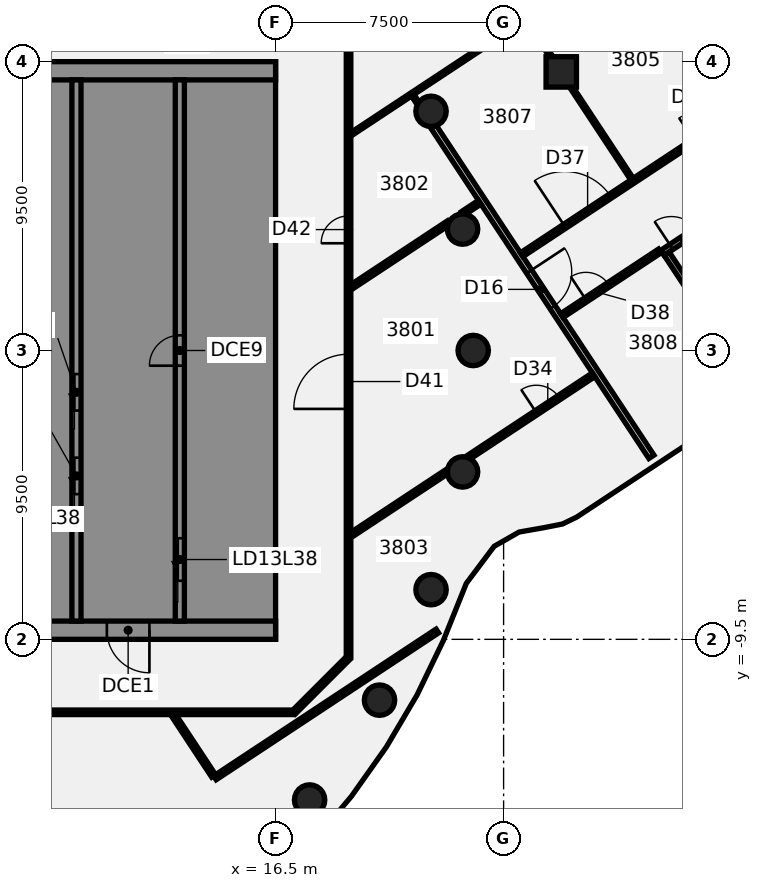
"""IFC4 building model, lengths in metres.
Left out: names, types, materials, properties, quantities, classifications, styles, units other than length and angle.
Written with IfcOpenShell. Run it as: python <this file> out.ifc"""

import sys

from ifc_helpers import new_model, si_unit, direction, frame, frame_2d, origin, origin_2d, place, context, subcontext, project, spatial, polyline, rectangle, circle, outline, extrude, element, fill, save


model = new_model("IFC4")
c1 = context("Model", 3, precision=1e-05, world=origin(), true_north=direction((0.0, 1.0)))
c2 = subcontext(c1, "Body", "Model", "MODEL_VIEW")
j1 = project(units=[si_unit("LENGTHUNIT", "METRE"), si_unit("PLANEANGLEUNIT", "RADIAN")], contexts=[c1])
p1 = place(None, origin())
s1 = spatial("IfcSite", under=j1, at=p1, CompositionType="ELEMENT")
p2 = place(p1, origin())
s2 = spatial("IfcBuilding", under=s1, at=p2, CompositionType="ELEMENT")
p3 = place(p2, frame((0.0, 0.0, 155.5)))
s3 = spatial("IfcBuildingStorey", under=s2, at=p3, CompositionType="ELEMENT", Elevation=155.5)
for number, where, z_axis, x_axis in (
    (1, (23.0, 0.0, -0.14), (0.0, 0.0, 1.0), (1.0, 0.0, 0.0)),
    (2, (22.651, 3.994, -0.14), (0.0, 0.0, 1.0), (1.0, 0.0, 0.0)),
    (3, (21.613, 7.866, -0.14), (0.0, 0.0, 1.0), (1.0, 0.0, 0.0)),
    (4, (17.619, -14.784, -0.14), (0.0, 0.0, 1.0), (1.0, 0.0, 0.0)),
    (5, (19.919, -11.5, -0.14), (0.0, 0.0, 1.0), (1.0, 0.0, 0.0)),
    (6, (21.613, -7.866, -0.14), (0.0, 0.0, 1.0), (1.0, 0.0, 0.0)),
    (7, (22.651, -3.994, -0.14), (0.0, 0.0, 1.0), (1.0, 0.0, 0.0)),
):
    element("IfcColumn", number, at=place(p3, frame(where, z_axis=z_axis, x_axis=x_axis)), inside=s3, PredefinedType="COLUMN", context=c2, shape_type="SweptSolid", body=[
        extrude(circle(Radius=0.5, at=origin_2d()), origin(), (0.0, 0.0, 1.0), 3.75),
    ])
p4 = place(p3, frame((25.896, 9.163, -0.139), z_axis=(-0.044706213481, 0.018481171221, 0.998829215025), x_axis=(0.55085630211, -0.833637157717, 0.040080215802)))
e8 = element("IfcColumn", 8, at=p4, inside=s3, PredefinedType="COLUMN", context=c2, shape_type="SweptSolid", body=[
    extrude(rectangle(XDim=1.0, YDim=1.0, at=origin_2d()), origin(), (0.0, 0.0, 1.0), 3.752),
])
p5 = place(p3, frame((2.494, -11.983, 0.0), z_axis=(0.0, 0.0, 1.0), x_axis=(0.550935265348, -0.834547981482, 0.0)))
e9 = element("IfcWall", 9, at=p5, inside=s3, PredefinedType="PARTITIONING", context=c2, shape_type="SweptSolid", body=[
    extrude(rectangle(XDim=13.413, YDim=0.1, at=frame_2d((6.707, 0.0))), origin(), (0.0, 0.0, 1.0), 3.01),
])
p6 = place(p3, frame((13.147, -12.0, 0.0), z_axis=(0.0, 0.0, 1.0), x_axis=(0.550825117354, -0.834620686355, 0.0)))
e10 = element("IfcWall", 10, at=p6, inside=s3, PredefinedType="PARTITIONING", context=c2, shape_type="SweptSolid", body=[
    extrude(rectangle(XDim=2.388, YDim=0.15, at=frame_2d((1.194, 0.0))), origin(), (0.0, 0.0, 1.0), 3.01),
])
p7 = place(p3, frame((21.011, 8.394, 0.0), z_axis=(0.0, 0.0, 1.0), x_axis=(0.551266985396, -0.834328898464, 0.0)))
e11 = element("IfcWall", 11, at=p7, inside=s3, PredefinedType="PARTITIONING", context=c2, shape_type="SweptSolid", body=[
    extrude(rectangle(XDim=0.312, YDim=0.1, at=frame_2d((0.156, 0.0))), origin(), (0.0, 0.0, 1.0), 3.01),
])
p8 = place(p3, frame((21.684, 7.375, 0.0), z_axis=(0.0, 0.0, 1.0), x_axis=(0.550962555751, -0.834529964806, 0.0)))
e12 = element("IfcWall", 12, at=p8, inside=s3, PredefinedType="PARTITIONING", context=c2, shape_type="SweptSolid", body=[
    extrude(rectangle(XDim=13.028, YDim=0.2, at=frame_2d((6.514, 0.0))), origin(), (0.0, 0.0, 1.0), 3.01),
])
p9 = place(p8, frame((5.729, 0.0, 0.0)))
e13 = element("IfcOpeningElement", 13, at=p9, cuts=e12, PredefinedType="OPENING", context=c2, shape_type="SweptSolid", body=[
    extrude(rectangle(XDim=1.4, YDim=2.1, at=frame_2d((0.7, 1.05))), frame((0.0, 0.11, 0.0), z_axis=(0.0, -1.0, 0.0), x_axis=(1.0, 0.0, 0.0)), (0.0, 0.0, 1.0), 0.22),
])
p10 = place(p3, frame((25.204, 10.212, 0.0), z_axis=(0.0, 0.0, 1.0), x_axis=(0.551183703578, -0.834383919374, 0.0)))
e14 = element("IfcWall", 14, at=p10, inside=s3, PredefinedType="PARTITIONING", context=c2, shape_type="SweptSolid", body=[
    extrude(rectangle(XDim=0.578, YDim=0.1, at=frame_2d((0.289, 0.0))), origin(), (0.0, 0.0, 1.0), 3.01),
])
p11 = place(p3, frame((26.18, 8.732, 0.0), z_axis=(0.0, 0.0, 1.0), x_axis=(0.550851378046, -0.834603354477, 0.0)))
e15 = element("IfcWall", 15, at=p11, inside=s3, PredefinedType="PARTITIONING", context=c2, shape_type="SweptSolid", body=[
    extrude(rectangle(XDim=3.709, YDim=0.1, at=frame_2d((1.854, 0.0))), origin(), (0.0, 0.0, 1.0), 3.01),
])
p12 = place(p3, frame((28.976, 12.666, 0.0), z_axis=(0.0, 0.0, 1.0), x_axis=(0.550994449366, -0.834508907543, 0.0)))
e16 = element("IfcWall", 16, at=p12, inside=s3, PredefinedType="PARTITIONING", context=c2, shape_type="SweptSolid", body=[
    extrude(rectangle(XDim=5.451, YDim=0.1, at=frame_2d((2.726, 0.0))), origin(), (0.0, 0.0, 1.0), 3.01),
])
p13 = place(p3, frame((-17.1, -11.9, 0.0), z_axis=(0.0, 0.0, 1.0), x_axis=(1.0, 0.0, 0.0)))
e17 = element("IfcWall", 17, at=p13, inside=s3, PredefinedType="PARTITIONING", context=c2, shape_type="SweptSolid", body=[
    extrude(rectangle(XDim=34.165, YDim=0.15, at=frame_2d((17.083, 0.0))), origin(), (0.0, 0.0, 1.0), 3.01),
])
p14 = place(p13, frame((9.838, 0.0, 0.0)))
e18 = element("IfcOpeningElement", 18, at=p14, cuts=e17, PredefinedType="OPENING", context=c2, shape_type="SweptSolid", body=[
    extrude(rectangle(XDim=1.8, YDim=2.1, at=frame_2d((0.9, 1.05))), frame((0.0, 0.085, 0.0), z_axis=(0.0, -1.0, 0.0), x_axis=(1.0, 0.0, 0.0)), (0.0, 0.0, 1.0), 0.17),
])
p15 = place(p13, frame((3.45, 0.0, 0.0)))
e19 = element("IfcOpeningElement", 19, at=p15, cuts=e17, PredefinedType="OPENING", context=c2, shape_type="SweptSolid", body=[
    extrude(rectangle(XDim=1.8, YDim=2.1, at=frame_2d((0.9, 1.05))), frame((0.0, 0.085, 0.0), z_axis=(0.0, -1.0, 0.0), x_axis=(1.0, 0.0, 0.0)), (0.0, 0.0, 1.0), 0.17),
])
p16 = place(p13, frame((23.889, 0.0, 0.0)))
e20 = element("IfcOpeningElement", 20, at=p16, cuts=e17, PredefinedType="OPENING", context=c2, shape_type="SweptSolid", body=[
    extrude(rectangle(XDim=1.8, YDim=2.1, at=frame_2d((0.9, 1.05))), frame((0.0, 0.085, 0.0), z_axis=(0.0, -1.0, 0.0), x_axis=(1.0, 0.0, 0.0)), (0.0, 0.0, 1.0), 0.17),
])
p17 = place(p3, frame((14.504, -14.056, 0.0), z_axis=(0.0, 0.0, 1.0), x_axis=(0.83453104674, 0.550960916969, 0.0)))
e21 = element("IfcWall", 21, at=p17, inside=s3, PredefinedType="PARTITIONING", context=c2, shape_type="SweptSolid", body=[
    extrude(rectangle(XDim=8.767, YDim=0.15, at=frame_2d((4.384, 0.0))), origin(), (0.0, 0.0, 1.0), 3.01),
])
p18 = place(p3, frame((19.0, -6.055, 0.0), z_axis=(0.0, 0.0, 1.0), x_axis=(0.834514075332, 0.550986622409, 0.0)))
e22 = element("IfcWall", 22, at=p18, inside=s3, PredefinedType="PARTITIONING", context=c2, shape_type="SweptSolid", body=[
    extrude(rectangle(XDim=3.768, YDim=0.15, at=frame_2d((1.884, 0.0))), origin(), (0.0, 0.0, 1.0), 3.01),
])
p19 = place(p3, frame((22.824, -3.53, 0.0), z_axis=(0.0, 0.0, 1.0), x_axis=(0.834519729805, 0.550978058152, 0.0)))
e23 = element("IfcWall", 23, at=p19, inside=s3, PredefinedType="PARTITIONING", context=c2, shape_type="SweptSolid", body=[
    extrude(rectangle(XDim=4.957, YDim=0.15, at=frame_2d((2.479, 0.0))), origin(), (0.0, 0.0, 1.0), 3.01),
])
p20 = place(p19, frame((2.7, 0.0, 0.0)))
e24 = element("IfcOpeningElement", 24, at=p20, cuts=e23, PredefinedType="OPENING", context=c2, shape_type="SweptSolid", body=[
    extrude(rectangle(XDim=0.9, YDim=2.1, at=frame_2d((0.45, 1.05))), frame((0.0, 0.085, 0.0), z_axis=(0.0, -1.0, 0.0), x_axis=(1.0, 0.0, 0.0)), (0.0, 0.0, 1.0), 0.17),
])
p21 = place(p3, frame((19.0, 2.093, 0.0), z_axis=(0.0, 0.0, 1.0), x_axis=(0.834493361806, 0.551017993446, 0.0)))
e25 = element("IfcWall", 25, at=p21, inside=s3, PredefinedType="PARTITIONING", context=c2, shape_type="SweptSolid", body=[
    extrude(rectangle(XDim=3.831, YDim=0.15, at=frame_2d((1.916, 0.0))), origin(), (0.0, 0.0, 1.0), 3.01),
])
p22 = place(p3, frame((22.651, 4.504, 0.0), z_axis=(0.0, 0.0, 1.0), x_axis=(0.834599435949, 0.550857315022, 0.0)))
e26 = element("IfcWall", 26, at=p22, inside=s3, PredefinedType="PARTITIONING", context=c2, shape_type="SweptSolid", body=[
    extrude(rectangle(XDim=0.676, YDim=0.15, at=frame_2d((0.338, 0.0))), origin(), (0.0, 0.0, 1.0), 3.01),
])
p23 = place(p3, frame((18.983, 7.115, 0.0), z_axis=(0.0, 0.0, 1.0), x_axis=(0.834486104681, 0.551028983898, 0.0)))
e27 = element("IfcWall", 27, at=p23, inside=s3, PredefinedType="PARTITIONING", context=c2, shape_type="SweptSolid", body=[
    extrude(rectangle(XDim=5.026, YDim=0.1, at=frame_2d((2.513, 0.0))), origin(), (0.0, 0.0, 1.0), 3.01),
])
p24 = place(p3, frame((24.594, 3.15, 0.0), z_axis=(0.0, 0.0, 1.0), x_axis=(0.83452344528, 0.550972430598, 0.0)))
e28 = element("IfcWall", 28, at=p24, inside=s3, PredefinedType="PARTITIONING", context=c2, shape_type="SweptSolid", body=[
    extrude(rectangle(XDim=13.32, YDim=0.15, at=frame_2d((6.66, 0.0))), origin(), (0.0, 0.0, 1.0), 3.01),
])
p25 = place(p24, frame((6.8, 0.0, 0.0)))
e29 = element("IfcOpeningElement", 29, at=p25, cuts=e28, PredefinedType="OPENING", context=c2, shape_type="SweptSolid", body=[
    extrude(rectangle(XDim=0.9, YDim=2.1, at=frame_2d((0.45, 1.05))), frame((0.0, 0.085, 0.0), z_axis=(0.0, -1.0, 0.0), x_axis=(1.0, 0.0, 0.0)), (0.0, 0.0, 1.0), 0.17),
])
p26 = place(p24, frame((10.1, 0.0, 0.0)))
e30 = element("IfcOpeningElement", 30, at=p26, cuts=e28, PredefinedType="OPENING", context=c2, shape_type="SweptSolid", body=[
    extrude(rectangle(XDim=0.9, YDim=2.1, at=frame_2d((0.45, 1.05))), frame((0.0, 0.085, 0.0), z_axis=(0.0, -1.0, 0.0), x_axis=(1.0, 0.0, 0.0)), (0.0, 0.0, 1.0), 0.17),
])
p27 = place(p24, frame((1.7, 0.0, 0.0)))
e31 = element("IfcOpeningElement", 31, at=p27, cuts=e28, PredefinedType="OPENING", context=c2, shape_type="SweptSolid", body=[
    extrude(rectangle(XDim=1.8, YDim=2.1, at=frame_2d((0.9, 1.05))), frame((0.0, 0.085, 0.0), z_axis=(0.0, -1.0, 0.0), x_axis=(1.0, 0.0, 0.0)), (0.0, 0.0, 1.0), 0.17),
])
p28 = place(p3, frame((25.916, 1.147, 0.0), z_axis=(0.0, 0.0, 1.0), x_axis=(0.834600103277, 0.550856303958, 0.0)))
e32 = element("IfcWall", 32, at=p28, inside=s3, PredefinedType="PARTITIONING", context=c2, shape_type="SweptSolid", body=[
    extrude(rectangle(XDim=3.861, YDim=0.15, at=frame_2d((1.93, 0.0))), origin(), (0.0, 0.0, 1.0), 3.01),
])
p29 = place(p28, frame((0.95, 0.0, 0.0)))
e33 = element("IfcOpeningElement", 33, at=p29, cuts=e32, PredefinedType="OPENING", context=c2, shape_type="SweptSolid", body=[
    extrude(rectangle(XDim=0.9, YDim=2.1, at=frame_2d((0.45, 1.05))), frame((0.0, 0.085, 0.0), z_axis=(0.0, -1.0, 0.0), x_axis=(1.0, 0.0, 0.0)), (0.0, 0.0, 1.0), 0.17),
])
p30 = place(p3, frame((17.1, -11.9, 0.0), z_axis=(0.0, 0.0, 1.0), x_axis=(0.707106781187, 0.707106781187, 0.0)))
e34 = element("IfcWall", 34, at=p30, inside=s3, PredefinedType="PARTITIONING", context=c2, shape_type="SweptSolid", body=[
    extrude(rectangle(XDim=2.505, YDim=0.15, at=frame_2d((1.253, 0.0))), origin(), (0.0, 0.0, 1.0), 3.01),
])
p31 = place(p3, frame((18.9, -10.1, 0.0), z_axis=(0.0, 0.0, 1.0), x_axis=(0.0, 1.0, 0.0)))
e35 = element("IfcWall", 35, at=p31, inside=s3, PredefinedType="PARTITIONING", context=c2, shape_type="SweptSolid", body=[
    extrude(rectangle(XDim=20.2, YDim=0.15, at=frame_2d((10.1, 0.0))), origin(), (0.0, 0.0, 1.0), 3.01),
])
p32 = place(p31, frame((8.179, 0.0, 0.0)))
e36 = element("IfcOpeningElement", 36, at=p32, cuts=e35, PredefinedType="OPENING", context=c2, shape_type="SweptSolid", body=[
    extrude(rectangle(XDim=1.8, YDim=2.1, at=frame_2d((0.9, 1.05))), frame((0.0, 0.085, 0.0), z_axis=(0.0, -1.0, 0.0), x_axis=(1.0, 0.0, 0.0)), (0.0, 0.0, 1.0), 0.17),
])
p33 = place(p31, frame((13.627, 0.0, 0.0)))
e37 = element("IfcOpeningElement", 37, at=p33, cuts=e35, PredefinedType="OPENING", context=c2, shape_type="SweptSolid", body=[
    extrude(rectangle(XDim=0.9, YDim=2.1, at=frame_2d((0.45, 1.05))), frame((0.0, 0.085, 0.0), z_axis=(0.0, -1.0, 0.0), x_axis=(1.0, 0.0, 0.0)), (0.0, 0.0, 1.0), 0.17),
])
p34 = place(p3, frame((16.5, -9.2, 0.0), z_axis=(0.0, 0.0, 1.0), x_axis=(-1.0, 0.0, 0.0)))
e38 = element("IfcWall", 38, at=p34, inside=s3, PredefinedType="SHEAR", context=c2, shape_type="SweptSolid", body=[
    extrude(rectangle(XDim=13.0, YDim=0.6, at=frame_2d((6.5, 0.0))), origin(), (0.0, 0.0, 1.0), 3.61),
])
p35 = place(p34, frame((4.15, 0.0, 0.0)))
e39 = element("IfcOpeningElement", 39, at=p35, cuts=e38, PredefinedType="OPENING", context=c2, shape_type="SweptSolid", body=[
    extrude(rectangle(XDim=1.4, YDim=2.1, at=frame_2d((0.7, 1.05))), frame((0.0, 0.31, 0.0), z_axis=(0.0, -1.0, 0.0), x_axis=(1.0, 0.0, 0.0)), (0.0, 0.0, 1.0), 0.62),
])
p36 = place(p34, frame((10.125, 0.0, 0.0)))
e40 = element("IfcOpeningElement", 40, at=p36, cuts=e38, PredefinedType="OPENING", context=c2, shape_type="SweptSolid", body=[
    extrude(rectangle(XDim=1.4, YDim=2.1, at=frame_2d((0.7, 1.05))), frame((0.0, 0.31, 0.0), z_axis=(0.0, -1.0, 0.0), x_axis=(1.0, 0.0, 0.0)), (0.0, 0.0, 1.0), 0.62),
])
p37 = place(p3, origin())
e41 = element("IfcWall", 41, at=p37, inside=s3, PredefinedType="SHEAR", context=c2, shape_type="SweptSolid", body=[
    extrude(outline(polyline([(13.5, -8.125), (13.5, -8.9), (15.9, -8.9), (16.5, -8.9), (16.5, 8.9), (15.9, 8.9), (13.5, 8.9), (13.5, 8.125), (15.9, 8.125), (15.9, 5.625), (13.5, 5.625), (13.5, 5.375), (15.9, 5.375), (15.9, -5.375), (13.5, -5.375), (13.5, -5.625), (15.9, -5.625), (15.9, -8.125), (13.5, -8.125)])), origin(), (0.0, 0.0, 1.0), 3.61),
])
p38 = place(p3, frame((16.5, 9.2, 0.0), z_axis=(0.0, 0.0, 1.0), x_axis=(-1.0, 0.0, 0.0)))
e42 = element("IfcWall", 42, at=p38, inside=s3, PredefinedType="SHEAR", context=c2, shape_type="SweptSolid", body=[
    extrude(rectangle(XDim=13.0, YDim=0.6, at=frame_2d((6.5, 0.0))), origin(), (0.0, 0.0, 1.0), 3.61),
])
p39 = place(p3, origin())
e43 = element("IfcWall", 43, at=p39, inside=s3, PredefinedType="SHEAR", context=c2, shape_type="SweptSolid", body=[
    extrude(outline(polyline([(9.8, -5.375), (7.5, -5.375), (7.5, -2.875), (9.8, -2.875), (9.8, -2.625), (7.5, -2.625), (7.5, -0.125), (9.8, -0.125), (9.8, 0.125), (7.5, 0.125), (7.5, 2.625), (9.8, 2.625), (9.8, 2.875), (7.5, 2.875), (7.5, 5.375), (9.8, 5.375), (9.8, 5.625), (7.5, 5.625), (7.5, 8.125), (9.8, 8.125), (9.8, 8.9), (7.5, 8.9), (7.2, 8.9), (7.2, -5.625), (7.5, -5.625), (9.8, -5.625), (9.8, -5.375)])), origin(), (0.0, 0.0, 1.0), 3.61),
])
p40 = place(p3, origin())
e44 = element("IfcWall", 44, at=p40, inside=s3, PredefinedType="SHEAR", context=c2, shape_type="SweptSolid", body=[
    extrude(outline(polyline([(7.5, -8.125), (7.5, -8.9), (9.8, -8.9), (9.8, -8.125), (9.8, -5.625), (9.55, -5.625), (9.55, -8.125), (7.5, -8.125)])), origin(), (0.0, 0.0, 1.0), 3.61),
])
p41 = place(p3, frame((13.35, -8.9, 0.0), z_axis=(0.0, 0.0, 1.0), x_axis=(0.0, 1.0, 0.0)))
e45 = element("IfcWall", 45, at=p41, inside=s3, PredefinedType="SHEAR", context=c2, shape_type="SweptSolid", body=[
    extrude(rectangle(XDim=17.8, YDim=0.3, at=frame_2d((8.9, 0.0))), origin(), (0.0, 0.0, 1.0), 3.61),
])
p42 = place(p41, frame((1.325, 0.0, 0.0)))
e46 = element("IfcOpeningElement", 46, at=p42, cuts=e45, PredefinedType="OPENING", context=c2, shape_type="SweptSolid", body=[
    extrude(rectangle(XDim=1.4, YDim=2.1, at=frame_2d((0.7, 1.05))), frame((0.0, 0.16, 0.0), z_axis=(0.0, -1.0, 0.0), x_axis=(1.0, 0.0, 0.0)), (0.0, 0.0, 1.0), 0.32),
])
p43 = place(p41, frame((8.4, 0.0, 0.0)))
e47 = element("IfcOpeningElement", 47, at=p43, cuts=e45, PredefinedType="OPENING", context=c2, shape_type="SweptSolid", body=[
    extrude(rectangle(XDim=1.0, YDim=2.1, at=frame_2d((0.5, 1.05))), frame((0.0, 0.16, 0.0), z_axis=(0.0, -1.0, 0.0), x_axis=(1.0, 0.0, 0.0)), (0.0, 0.0, 1.0), 0.32),
])
p44 = place(p3, frame((9.95, -8.9, 0.0), z_axis=(0.0, 0.0, 1.0), x_axis=(0.0, 1.0, 0.0)))
e48 = element("IfcWall", 48, at=p44, inside=s3, PredefinedType="SHEAR", context=c2, shape_type="SweptSolid", body=[
    extrude(rectangle(XDim=17.8, YDim=0.3, at=frame_2d((8.9, 0.0))), origin(), (0.0, 0.0, 1.0), 3.61),
])
p45 = place(p44, frame((4.175, 0.0, 0.0)))
e49 = element("IfcOpeningElement", 49, at=p45, cuts=e48, PredefinedType="OPENING", context=c2, shape_type="SweptSolid", body=[
    extrude(rectangle(XDim=1.2, YDim=2.1, at=frame_2d((0.6, 1.05))), frame((0.0, 0.16, 0.0), z_axis=(0.0, -1.0, 0.0), x_axis=(1.0, 0.0, 0.0)), (0.0, 0.0, 1.0), 0.32),
])
p46 = place(p44, frame((6.925, 0.0, 0.0)))
e50 = element("IfcOpeningElement", 50, at=p46, cuts=e48, PredefinedType="OPENING", context=c2, shape_type="SweptSolid", body=[
    extrude(rectangle(XDim=1.2, YDim=2.1, at=frame_2d((0.6, 1.05))), frame((0.0, 0.16, 0.0), z_axis=(0.0, -1.0, 0.0), x_axis=(1.0, 0.0, 0.0)), (0.0, 0.0, 1.0), 0.32),
])
p47 = place(p3, frame((29.226, 3.213, -0.14), z_axis=(0.0, 0.0, 1.0), x_axis=(0.834514241837, 0.550986370222, 0.0)))
e51 = element("IfcWall", 51, at=p47, inside=s3, PredefinedType="SHEAR", context=c2, shape_type="SweptSolid", body=[
    extrude(rectangle(XDim=6.7, YDim=0.2, at=frame_2d((3.35, 0.0))), origin(), (0.0, 0.0, 1.0), 3.15),
])
p48 = place(p47, frame((0.35, 0.0, 0.0)))
e52 = element("IfcOpeningElement", 52, at=p48, cuts=e51, PredefinedType="OPENING", context=c2, shape_type="SweptSolid", body=[
    extrude(rectangle(XDim=1.0, YDim=2.1, at=frame_2d((0.5, 1.05))), frame((0.0, 0.11, 0.0), z_axis=(0.0, -1.0, 0.0), x_axis=(1.0, 0.0, 0.0)), (0.0, 0.0, 1.0), 0.22),
])
p49 = place(p3, frame((31.127, 0.514, -0.14), z_axis=(0.0, 0.0, 1.0), x_axis=(-0.550997380847, 0.83450697199, 0.0)))
e53 = element("IfcWall", 53, at=p49, inside=s3, PredefinedType="SHEAR", context=c2, shape_type="SweptSolid", body=[
    extrude(rectangle(XDim=3.2, YDim=0.2, at=frame_2d((1.6, 0.0))), origin(), (0.0, 0.0, 1.0), 3.15),
])
p50 = place(p9, frame((1.4, 0.0, 0.0), z_axis=(0.0, 0.0, 1.0), x_axis=(-1.0, 0.0, 0.0)))
e54 = element("IfcDoor", 54, at=p50, inside=s3, OperationType="DOUBLE_DOOR_SINGLE_SWING", PredefinedType="DOOR", context=c2, shape_type="SweptSolid", body=[
    extrude(rectangle(XDim=1.4, YDim=2.1, at=frame_2d((0.7, 1.05))), frame((0.0, 0.025, 0.0), z_axis=(0.0, -1.0, 0.0), x_axis=(1.0, 0.0, 0.0)), (0.0, 0.0, 1.0), 0.05),
])
fill(e13, e54)
p51 = place(p20, frame((0.9, 0.0, 0.0), z_axis=(0.0, 0.0, 1.0), x_axis=(-1.0, 0.0, 0.0)))
e55 = element("IfcDoor", 55, at=p51, inside=s3, OperationType="SINGLE_SWING_RIGHT", PredefinedType="DOOR", context=c2, shape_type="SweptSolid", body=[
    extrude(rectangle(XDim=0.9, YDim=2.1, at=frame_2d((0.45, 1.05))), frame((0.0, 0.025, 0.0), z_axis=(0.0, -1.0, 0.0), x_axis=(1.0, 0.0, 0.0)), (0.0, 0.0, 1.0), 0.05),
])
fill(e24, e55)
p52 = place(p27, origin())
e56 = element("IfcDoor", 56, at=p52, inside=s3, OperationType="DOUBLE_DOOR_SINGLE_SWING", PredefinedType="DOOR", context=c2, shape_type="SweptSolid", body=[
    extrude(rectangle(XDim=1.8, YDim=2.1, at=frame_2d((0.9, 1.05))), frame((0.0, 0.025, 0.0), z_axis=(0.0, -1.0, 0.0), x_axis=(1.0, 0.0, 0.0)), (0.0, 0.0, 1.0), 0.05),
])
fill(e31, e56)
p53 = place(p29, frame((0.9, 0.0, 0.0), z_axis=(0.0, 0.0, 1.0), x_axis=(-1.0, 0.0, 0.0)))
e57 = element("IfcDoor", 57, at=p53, inside=s3, OperationType="SINGLE_SWING_LEFT", PredefinedType="DOOR", context=c2, shape_type="SweptSolid", body=[
    extrude(rectangle(XDim=0.9, YDim=2.1, at=frame_2d((0.45, 1.05))), frame((0.0, 0.025, 0.0), z_axis=(0.0, -1.0, 0.0), x_axis=(1.0, 0.0, 0.0)), (0.0, 0.0, 1.0), 0.05),
])
fill(e33, e57)
p54 = place(p32, origin())
e58 = element("IfcDoor", 58, at=p54, inside=s3, OperationType="DOUBLE_DOOR_SINGLE_SWING", PredefinedType="DOOR", context=c2, shape_type="SweptSolid", body=[
    extrude(rectangle(XDim=1.8, YDim=2.1, at=frame_2d((0.9, 1.05))), frame((0.0, 0.025, 0.0), z_axis=(0.0, -1.0, 0.0), x_axis=(1.0, 0.0, 0.0)), (0.0, 0.0, 1.0), 0.05),
])
fill(e36, e58)
p55 = place(p33, frame((0.9, 0.0, 0.0), z_axis=(0.0, 0.0, 1.0), x_axis=(-1.0, 0.0, 0.0)))
e59 = element("IfcDoor", 59, at=p55, inside=s3, OperationType="SINGLE_SWING_RIGHT", PredefinedType="DOOR", context=c2, shape_type="SweptSolid", body=[
    extrude(rectangle(XDim=0.9, YDim=2.1, at=frame_2d((0.45, 1.05))), frame((0.0, 0.025, 0.0), z_axis=(0.0, -1.0, 0.0), x_axis=(1.0, 0.0, 0.0)), (0.0, 0.0, 1.0), 0.05),
])
fill(e37, e59)
p56 = place(p35, origin())
e60 = element("IfcDoor", 60, at=p56, inside=s3, OperationType="SINGLE_SWING_LEFT", PredefinedType="DOOR", context=c2, shape_type="SweptSolid", body=[
    extrude(rectangle(XDim=1.4, YDim=2.1, at=frame_2d((0.7, 1.05))), frame((0.0, 0.025, 0.0), z_axis=(0.0, -1.0, 0.0), x_axis=(1.0, 0.0, 0.0)), (0.0, 0.0, 1.0), 0.05),
])
fill(e39, e60)
p57 = place(p42, origin())
e61 = element("IfcDoor", 61, at=p57, inside=s3, OperationType="SLIDING_TO_LEFT", PredefinedType="DOOR", context=c2, shape_type="SweptSolid", body=[
    extrude(rectangle(XDim=1.4, YDim=2.1, at=frame_2d((0.7, 1.05))), frame((0.0, 0.025, 0.0), z_axis=(0.0, -1.0, 0.0), x_axis=(1.0, 0.0, 0.0)), (0.0, 0.0, 1.0), 0.05),
])
fill(e46, e61)
p58 = place(p45, origin())
e62 = element("IfcDoor", 62, at=p58, inside=s3, OperationType="SLIDING_TO_LEFT", PredefinedType="DOOR", context=c2, shape_type="SweptSolid", body=[
    extrude(rectangle(XDim=1.2, YDim=2.1, at=frame_2d((0.6, 1.05))), frame((0.0, 0.025, 0.0), z_axis=(0.0, -1.0, 0.0), x_axis=(1.0, 0.0, 0.0)), (0.0, 0.0, 1.0), 0.05),
])
fill(e49, e62)
p59 = place(p46, origin())
e63 = element("IfcDoor", 63, at=p59, inside=s3, OperationType="SLIDING_TO_LEFT", PredefinedType="DOOR", context=c2, shape_type="SweptSolid", body=[
    extrude(rectangle(XDim=1.2, YDim=2.1, at=frame_2d((0.6, 1.05))), frame((0.0, 0.025, 0.0), z_axis=(0.0, -1.0, 0.0), x_axis=(1.0, 0.0, 0.0)), (0.0, 0.0, 1.0), 0.05),
])
fill(e50, e63)
p60 = place(p43, origin())
e64 = element("IfcDoor", 64, at=p60, inside=s3, OperationType="SINGLE_SWING_LEFT", PredefinedType="DOOR", context=c2, shape_type="SweptSolid", body=[
    extrude(rectangle(XDim=1.0, YDim=2.1, at=frame_2d((0.5, 1.05))), frame((0.0, 0.025, 0.0), z_axis=(0.0, -1.0, 0.0), x_axis=(1.0, 0.0, 0.0)), (0.0, 0.0, 1.0), 0.05),
])
fill(e47, e64)
p61 = place(p48, origin())
e65 = element("IfcDoor", 65, at=p61, inside=s3, OperationType="SINGLE_SWING_LEFT", PredefinedType="DOOR", context=c2, shape_type="SweptSolid", body=[
    extrude(rectangle(XDim=1.0, YDim=2.1, at=frame_2d((0.5, 1.05))), frame((0.0, 0.025, 0.0), z_axis=(0.0, -1.0, 0.0), x_axis=(1.0, 0.0, 0.0)), (0.0, 0.0, 1.0), 0.05),
])
fill(e52, e65)
save(model, sys.argv[1])
